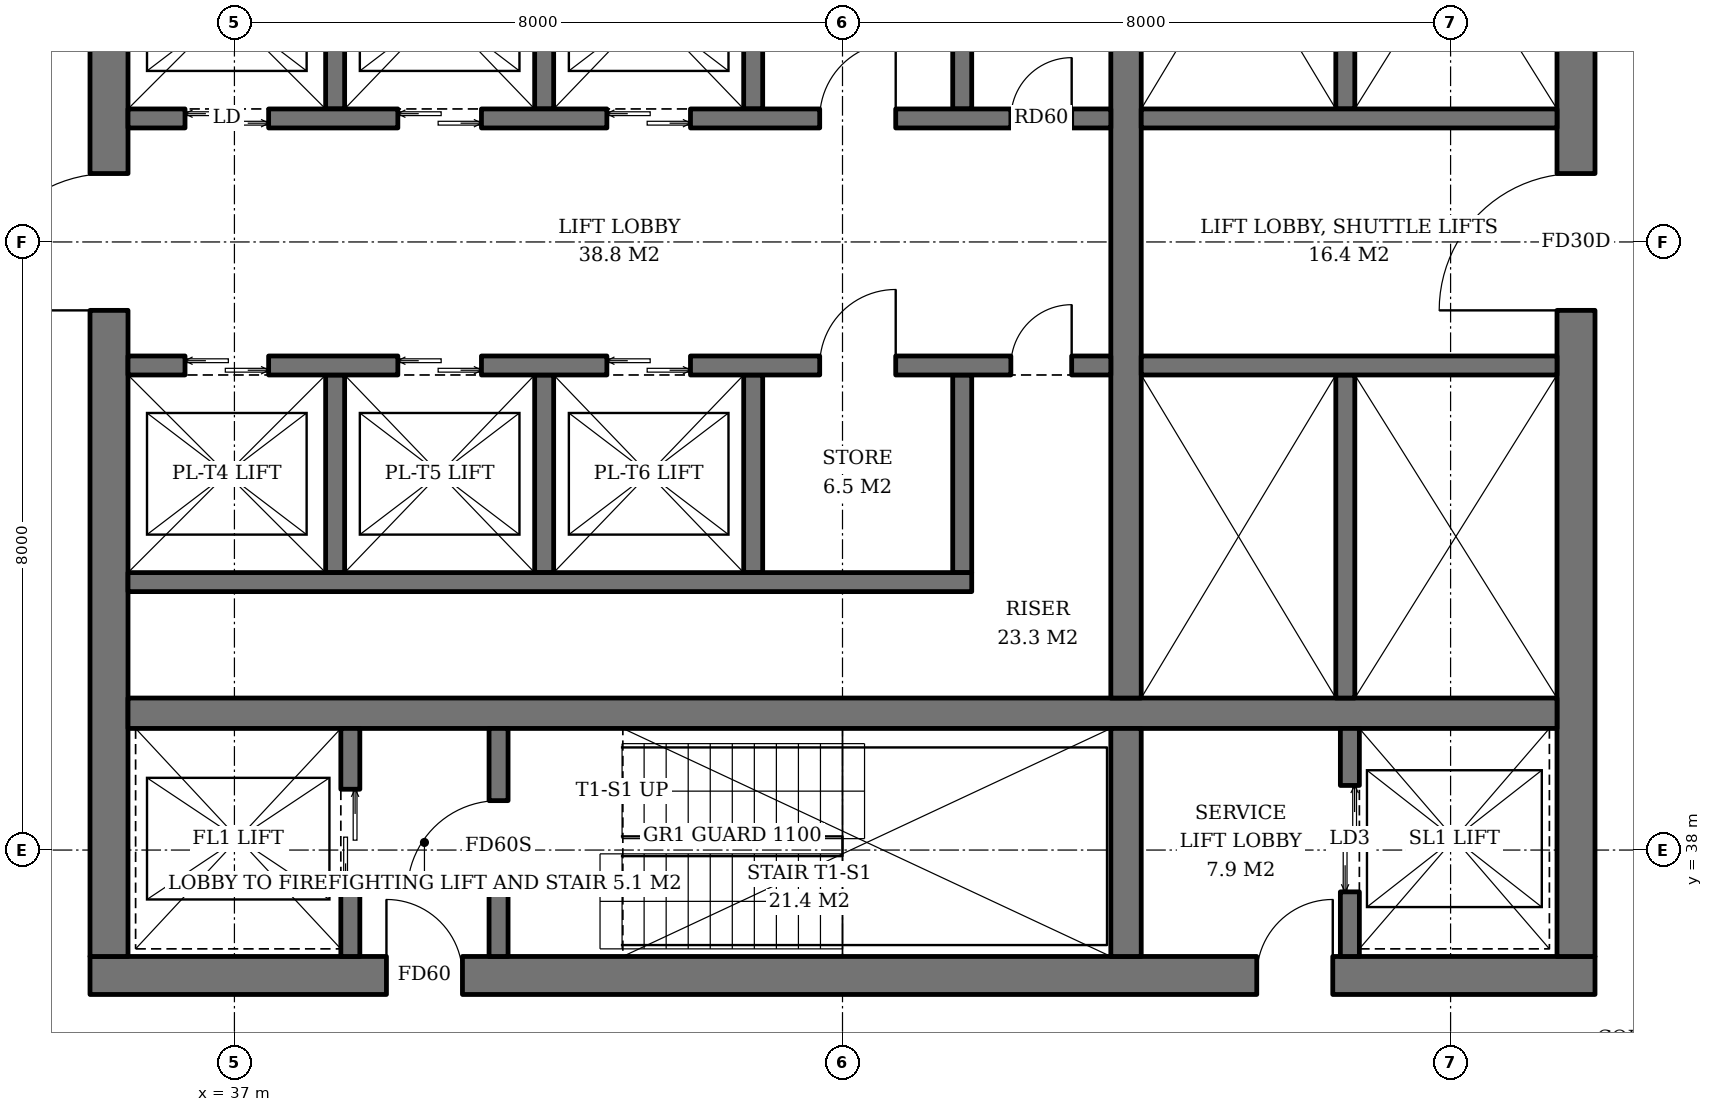
"""IFC4 building model, lengths in metres.
Left out: names, types, materials, properties, quantities, classifications, styles, units other than length and angle.
Written with IfcOpenShell. Run it as: python <this file> out.ifc"""

import sys

from ifc_helpers import new_model, si_unit, direction, frame, frame_2d, origin, place, context, subcontext, project, spatial, rectangle, extrude, element, fill, save


model = new_model("IFC4")
c1 = context("Model", 3, precision=1e-05, world=origin(), true_north=direction((0.0, 1.0)))
c2 = subcontext(c1, "Body", "Model", "MODEL_VIEW")
j1 = project(units=[si_unit("LENGTHUNIT", "METRE"), si_unit("PLANEANGLEUNIT", "RADIAN")], contexts=[c1])
p1 = place(None, origin())
s1 = spatial("IfcSite", under=j1, at=p1, CompositionType="ELEMENT")
p2 = place(p1, origin())
s2 = spatial("IfcBuilding", under=s1, at=p2, CompositionType="ELEMENT")
p3 = place(p2, frame((0.0, 0.0, 241.4)))
s3 = spatial("IfcBuildingStorey", under=s2, at=p3, CompositionType="ELEMENT", Elevation=241.4)
p4 = place(p3, frame((35.1, 36.35, 0.0), z_axis=(0.0, 0.0, 1.0), x_axis=(1.0, 0.0, 0.0)))
e1 = element("IfcWall", 1, at=p4, inside=s3, PredefinedType="SHEAR", context=c2, shape_type="SweptSolid", body=[
    extrude(rectangle(XDim=19.8, YDim=0.5, at=frame_2d((9.9, 0.0))), origin(), (0.0, 0.0, 1.0), 3.8),
])
p5 = place(p4, frame((3.9, 0.0, 0.0)))
e2 = element("IfcOpeningElement", 2, at=p5, cuts=e1, PredefinedType="OPENING", context=c2, shape_type="SweptSolid", body=[
    extrude(rectangle(XDim=1.0, YDim=2.1, at=frame_2d((0.5, 1.05))), frame((0.0, 0.26, 0.0), z_axis=(0.0, -1.0, 0.0), x_axis=(1.0, 0.0, 0.0)), (0.0, 0.0, 1.0), 0.52),
])
p6 = place(p4, frame((15.35, 0.0, 0.0)))
e3 = element("IfcOpeningElement", 3, at=p6, cuts=e1, PredefinedType="OPENING", context=c2, shape_type="SweptSolid", body=[
    extrude(rectangle(XDim=1.0, YDim=2.1, at=frame_2d((0.5, 1.05))), frame((0.0, 0.26, 0.0), z_axis=(0.0, -1.0, 0.0), x_axis=(1.0, 0.0, 0.0)), (0.0, 0.0, 1.0), 0.52),
])
p7 = place(p3, frame((35.35, 36.6, 0.0), z_axis=(0.0, 0.0, 1.0), x_axis=(0.0, 1.0, 0.0)))
e4 = element("IfcWall", 4, at=p7, inside=s3, PredefinedType="SHEAR", context=c2, shape_type="SweptSolid", body=[
    extrude(rectangle(XDim=18.8, YDim=0.5, at=frame_2d((9.4, 0.0))), origin(), (0.0, 0.0, 1.0), 3.8),
])
p8 = place(p7, frame((8.5, 0.0, 0.0)))
e5 = element("IfcOpeningElement", 5, at=p8, cuts=e4, PredefinedType="OPENING", context=c2, shape_type="SweptSolid", body=[
    extrude(rectangle(XDim=1.8, YDim=2.4, at=frame_2d((0.9, 1.2))), frame((0.0, 0.26, 0.0), z_axis=(0.0, -1.0, 0.0), x_axis=(1.0, 0.0, 0.0)), (0.0, 0.0, 1.0), 0.52),
])
p9 = place(p3, frame((54.65, 36.6, 0.0), z_axis=(0.0, 0.0, 1.0), x_axis=(0.0, 1.0, 0.0)))
e6 = element("IfcWall", 6, at=p9, inside=s3, PredefinedType="SHEAR", context=c2, shape_type="SweptSolid", body=[
    extrude(rectangle(XDim=18.8, YDim=0.5, at=frame_2d((9.4, 0.0))), origin(), (0.0, 0.0, 1.0), 3.8),
])
p10 = place(p9, frame((8.5, 0.0, 0.0)))
e7 = element("IfcOpeningElement", 7, at=p10, cuts=e6, PredefinedType="OPENING", context=c2, shape_type="SweptSolid", body=[
    extrude(rectangle(XDim=1.8, YDim=2.4, at=frame_2d((0.9, 1.2))), frame((0.0, 0.26, 0.0), z_axis=(0.0, -1.0, 0.0), x_axis=(1.0, 0.0, 0.0)), (0.0, 0.0, 1.0), 0.52),
])
p11 = place(p3, frame((35.6, 39.8, 0.0), z_axis=(0.0, 0.0, 1.0), x_axis=(1.0, 0.0, 0.0)))
e8 = element("IfcWall", 8, at=p11, inside=s3, PredefinedType="SHEAR", context=c2, shape_type="SweptSolid", body=[
    extrude(rectangle(XDim=18.8, YDim=0.4, at=frame_2d((9.4, 0.0))), origin(), (0.0, 0.0, 1.0), 3.8),
])
p12 = place(p3, frame((48.73, 36.6, 0.0), z_axis=(0.0, 0.0, 1.0), x_axis=(0.0, 1.0, 0.0)))
e9 = element("IfcWall", 9, at=p12, inside=s3, PredefinedType="SHEAR", context=c2, shape_type="SweptSolid", body=[
    extrude(rectangle(XDim=3.0, YDim=0.4, at=frame_2d((1.5, 0.0))), origin(), (0.0, 0.0, 1.0), 3.8),
])
p13 = place(p3, frame((48.73, 40.0, 0.0), z_axis=(0.0, 0.0, 1.0), x_axis=(0.0, 1.0, 0.0)))
e10 = element("IfcWall", 10, at=p13, inside=s3, PredefinedType="SHEAR", context=c2, shape_type="SweptSolid", body=[
    extrude(rectangle(XDim=12.0, YDim=0.4, at=frame_2d((6.0, 0.0))), origin(), (0.0, 0.0, 1.0), 3.8),
])
p14 = place(p3, frame((38.525, 36.6, 0.0), z_axis=(0.0, 0.0, 1.0), x_axis=(0.0, 1.0, 0.0)))
e11 = element("IfcWall", 11, at=p14, inside=s3, PredefinedType="SHEAR", context=c2, shape_type="SweptSolid", body=[
    extrude(rectangle(XDim=3.0, YDim=0.25, at=frame_2d((1.5, 0.0))), origin(), (0.0, 0.0, 1.0), 3.8),
])
p15 = place(p14, frame((0.9, 0.0, 0.0)))
e12 = element("IfcOpeningElement", 12, at=p15, cuts=e11, PredefinedType="OPENING", context=c2, shape_type="SweptSolid", body=[
    extrude(rectangle(XDim=1.3, YDim=2.2, at=frame_2d((0.65, 1.1))), frame((0.0, 0.135, 0.0), z_axis=(0.0, -1.0, 0.0), x_axis=(1.0, 0.0, 0.0)), (0.0, 0.0, 1.0), 0.27),
])
p16 = place(p3, frame((40.475, 36.6, 0.0), z_axis=(0.0, 0.0, 1.0), x_axis=(0.0, 1.0, 0.0)))
e13 = element("IfcWall", 13, at=p16, inside=s3, PredefinedType="SHEAR", context=c2, shape_type="SweptSolid", body=[
    extrude(rectangle(XDim=3.0, YDim=0.25, at=frame_2d((1.5, 0.0))), origin(), (0.0, 0.0, 1.0), 3.8),
])
p17 = place(p16, frame((0.85, 0.0, 0.0)))
e14 = element("IfcOpeningElement", 14, at=p17, cuts=e13, PredefinedType="OPENING", context=c2, shape_type="SweptSolid", body=[
    extrude(rectangle(XDim=1.2, YDim=2.1, at=frame_2d((0.6, 1.05))), frame((0.0, 0.135, 0.0), z_axis=(0.0, -1.0, 0.0), x_axis=(1.0, 0.0, 0.0)), (0.0, 0.0, 1.0), 0.27),
])
p18 = place(p3, frame((51.675, 36.6, 0.0), z_axis=(0.0, 0.0, 1.0), x_axis=(0.0, 1.0, 0.0)))
e15 = element("IfcWall", 15, at=p18, inside=s3, PredefinedType="SHEAR", context=c2, shape_type="SweptSolid", body=[
    extrude(rectangle(XDim=3.0, YDim=0.25, at=frame_2d((1.5, 0.0))), origin(), (0.0, 0.0, 1.0), 3.8),
])
p19 = place(p18, frame((0.85, 0.0, 0.0)))
e16 = element("IfcOpeningElement", 16, at=p19, cuts=e15, PredefinedType="OPENING", context=c2, shape_type="SweptSolid", body=[
    extrude(rectangle(XDim=1.4, YDim=2.4, at=frame_2d((0.7, 1.2))), frame((0.0, 0.135, 0.0), z_axis=(0.0, -1.0, 0.0), x_axis=(1.0, 0.0, 0.0)), (0.0, 0.0, 1.0), 0.27),
])
for number, where, z_axis, x_axis in (
    (17, (38.325, 47.75, 0.0), (0.0, 0.0, 1.0), (0.0, 1.0, 0.0)),
    (18, (41.075, 47.75, 0.0), (0.0, 0.0, 1.0), (0.0, 1.0, 0.0)),
    (19, (43.825, 47.75, 0.0), (0.0, 0.0, 1.0), (0.0, 1.0, 0.0)),
    (20, (46.575, 47.75, 0.0), (0.0, 0.0, 1.0), (0.0, 1.0, 0.0)),
):
    element("IfcWall", number, at=place(p3, frame(where, z_axis=z_axis, x_axis=x_axis)), inside=s3, PredefinedType="SHEAR", context=c2, shape_type="SweptSolid", body=[
        extrude(rectangle(XDim=2.6, YDim=0.25, at=frame_2d((1.3, 0.0))), origin(), (0.0, 0.0, 1.0), 3.8),
    ])
p20 = place(p3, frame((35.6, 47.625, 0.0), z_axis=(0.0, 0.0, 1.0), x_axis=(1.0, 0.0, 0.0)))
e21 = element("IfcWall", 21, at=p20, inside=s3, PredefinedType="SHEAR", context=c2, shape_type="SweptSolid", body=[
    extrude(rectangle(XDim=12.93, YDim=0.25, at=frame_2d((6.465, 0.0))), origin(), (0.0, 0.0, 1.0), 3.8),
])
p21 = place(p20, frame((0.75, 0.0, 0.0)))
e22 = element("IfcOpeningElement", 22, at=p21, cuts=e21, PredefinedType="OPENING", context=c2, shape_type="SweptSolid", body=[
    extrude(rectangle(XDim=1.1, YDim=2.2, at=frame_2d((0.55, 1.1))), frame((0.0, 0.135, 0.0), z_axis=(0.0, -1.0, 0.0), x_axis=(1.0, 0.0, 0.0)), (0.0, 0.0, 1.0), 0.27),
])
p22 = place(p20, frame((3.55, 0.0, 0.0)))
e23 = element("IfcOpeningElement", 23, at=p22, cuts=e21, PredefinedType="OPENING", context=c2, shape_type="SweptSolid", body=[
    extrude(rectangle(XDim=1.1, YDim=2.2, at=frame_2d((0.55, 1.1))), frame((0.0, 0.135, 0.0), z_axis=(0.0, -1.0, 0.0), x_axis=(1.0, 0.0, 0.0)), (0.0, 0.0, 1.0), 0.27),
])
p23 = place(p20, frame((6.3, 0.0, 0.0)))
e24 = element("IfcOpeningElement", 24, at=p23, cuts=e21, PredefinedType="OPENING", context=c2, shape_type="SweptSolid", body=[
    extrude(rectangle(XDim=1.1, YDim=2.2, at=frame_2d((0.55, 1.1))), frame((0.0, 0.135, 0.0), z_axis=(0.0, -1.0, 0.0), x_axis=(1.0, 0.0, 0.0)), (0.0, 0.0, 1.0), 0.27),
])
p24 = place(p20, frame((9.1, 0.0, 0.0)))
e25 = element("IfcOpeningElement", 25, at=p24, cuts=e21, PredefinedType="OPENING", context=c2, shape_type="SweptSolid", body=[
    extrude(rectangle(XDim=1.0, YDim=2.1, at=frame_2d((0.5, 1.05))), frame((0.0, 0.135, 0.0), z_axis=(0.0, -1.0, 0.0), x_axis=(1.0, 0.0, 0.0)), (0.0, 0.0, 1.0), 0.27),
])
p25 = place(p20, frame((11.615, 0.0, 0.0)))
e26 = element("IfcOpeningElement", 26, at=p25, cuts=e21, PredefinedType="OPENING", context=c2, shape_type="SweptSolid", body=[
    extrude(rectangle(XDim=0.8, YDim=2.0, at=frame_2d((0.4, 1.0))), frame((0.0, 0.135, 0.0), z_axis=(0.0, -1.0, 0.0), x_axis=(1.0, 0.0, 0.0)), (0.0, 0.0, 1.0), 0.27),
])
for number, where, z_axis, x_axis in (
    (27, (38.325, 44.25, 0.0), (0.0, 0.0, 1.0), (0.0, -1.0, 0.0)),
    (28, (41.075, 44.25, 0.0), (0.0, 0.0, 1.0), (0.0, -1.0, 0.0)),
    (29, (43.825, 44.25, 0.0), (0.0, 0.0, 1.0), (0.0, -1.0, 0.0)),
    (30, (46.575, 44.25, 0.0), (0.0, 0.0, 1.0), (0.0, -1.0, 0.0)),
):
    element("IfcWall", number, at=place(p3, frame(where, z_axis=z_axis, x_axis=x_axis)), inside=s3, PredefinedType="SHEAR", context=c2, shape_type="SweptSolid", body=[
        extrude(rectangle(XDim=2.6, YDim=0.25, at=frame_2d((1.3, 0.0))), origin(), (0.0, 0.0, 1.0), 3.8),
    ])
p26 = place(p3, frame((35.6, 41.525, 0.0), z_axis=(0.0, 0.0, 1.0), x_axis=(1.0, 0.0, 0.0)))
e31 = element("IfcWall", 31, at=p26, inside=s3, PredefinedType="SHEAR", context=c2, shape_type="SweptSolid", body=[
    extrude(rectangle(XDim=11.1, YDim=0.25, at=frame_2d((5.55, 0.0))), origin(), (0.0, 0.0, 1.0), 3.8),
])
p27 = place(p3, frame((35.6, 44.375, 0.0), z_axis=(0.0, 0.0, 1.0), x_axis=(1.0, 0.0, 0.0)))
e32 = element("IfcWall", 32, at=p27, inside=s3, PredefinedType="SHEAR", context=c2, shape_type="SweptSolid", body=[
    extrude(rectangle(XDim=12.93, YDim=0.25, at=frame_2d((6.465, 0.0))), origin(), (0.0, 0.0, 1.0), 3.8),
])
p28 = place(p27, frame((0.75, 0.0, 0.0)))
e33 = element("IfcOpeningElement", 33, at=p28, cuts=e32, PredefinedType="OPENING", context=c2, shape_type="SweptSolid", body=[
    extrude(rectangle(XDim=1.1, YDim=2.2, at=frame_2d((0.55, 1.1))), frame((0.0, 0.135, 0.0), z_axis=(0.0, -1.0, 0.0), x_axis=(1.0, 0.0, 0.0)), (0.0, 0.0, 1.0), 0.27),
])
p29 = place(p27, frame((3.55, 0.0, 0.0)))
e34 = element("IfcOpeningElement", 34, at=p29, cuts=e32, PredefinedType="OPENING", context=c2, shape_type="SweptSolid", body=[
    extrude(rectangle(XDim=1.1, YDim=2.2, at=frame_2d((0.55, 1.1))), frame((0.0, 0.135, 0.0), z_axis=(0.0, -1.0, 0.0), x_axis=(1.0, 0.0, 0.0)), (0.0, 0.0, 1.0), 0.27),
])
p30 = place(p27, frame((6.3, 0.0, 0.0)))
e35 = element("IfcOpeningElement", 35, at=p30, cuts=e32, PredefinedType="OPENING", context=c2, shape_type="SweptSolid", body=[
    extrude(rectangle(XDim=1.1, YDim=2.2, at=frame_2d((0.55, 1.1))), frame((0.0, 0.135, 0.0), z_axis=(0.0, -1.0, 0.0), x_axis=(1.0, 0.0, 0.0)), (0.0, 0.0, 1.0), 0.27),
])
p31 = place(p27, frame((9.1, 0.0, 0.0)))
e36 = element("IfcOpeningElement", 36, at=p31, cuts=e32, PredefinedType="OPENING", context=c2, shape_type="SweptSolid", body=[
    extrude(rectangle(XDim=1.0, YDim=2.1, at=frame_2d((0.5, 1.05))), frame((0.0, 0.135, 0.0), z_axis=(0.0, -1.0, 0.0), x_axis=(1.0, 0.0, 0.0)), (0.0, 0.0, 1.0), 0.27),
])
p32 = place(p27, frame((11.615, 0.0, 0.0)))
e37 = element("IfcOpeningElement", 37, at=p32, cuts=e32, PredefinedType="OPENING", context=c2, shape_type="SweptSolid", body=[
    extrude(rectangle(XDim=0.8, YDim=2.0, at=frame_2d((0.4, 1.0))), frame((0.0, 0.135, 0.0), z_axis=(0.0, -1.0, 0.0), x_axis=(1.0, 0.0, 0.0)), (0.0, 0.0, 1.0), 0.27),
])
p33 = place(p3, frame((51.615, 47.75, 0.0), z_axis=(0.0, 0.0, 1.0), x_axis=(0.0, 1.0, 0.0)))
e38 = element("IfcWall", 38, at=p33, inside=s3, PredefinedType="SHEAR", context=c2, shape_type="SweptSolid", body=[
    extrude(rectangle(XDim=4.25, YDim=0.25, at=frame_2d((2.125, 0.0))), origin(), (0.0, 0.0, 1.0), 3.8),
])
p34 = place(p3, frame((48.93, 47.625, 0.0), z_axis=(0.0, 0.0, 1.0), x_axis=(1.0, 0.0, 0.0)))
e39 = element("IfcWall", 39, at=p34, inside=s3, PredefinedType="SHEAR", context=c2, shape_type="SweptSolid", body=[
    extrude(rectangle(XDim=5.47, YDim=0.25, at=frame_2d((2.735, 0.0))), origin(), (0.0, 0.0, 1.0), 3.8),
])
p35 = place(p3, frame((51.615, 44.25, 0.0), z_axis=(0.0, 0.0, 1.0), x_axis=(0.0, -1.0, 0.0)))
e40 = element("IfcWall", 40, at=p35, inside=s3, PredefinedType="SHEAR", context=c2, shape_type="SweptSolid", body=[
    extrude(rectangle(XDim=4.25, YDim=0.25, at=frame_2d((2.125, 0.0))), origin(), (0.0, 0.0, 1.0), 3.8),
])
p36 = place(p3, frame((48.93, 44.375, 0.0), z_axis=(0.0, 0.0, 1.0), x_axis=(1.0, 0.0, 0.0)))
e41 = element("IfcWall", 41, at=p36, inside=s3, PredefinedType="SHEAR", context=c2, shape_type="SweptSolid", body=[
    extrude(rectangle(XDim=5.47, YDim=0.25, at=frame_2d((2.735, 0.0))), origin(), (0.0, 0.0, 1.0), 3.8),
])
p37 = place(p15, origin())
e42 = element("IfcDoor", 42, at=p37, inside=s3, OperationType="DOUBLE_DOOR_SLIDING", PredefinedType="DOOR", context=c2, shape_type="SweptSolid", body=[
    extrude(rectangle(XDim=1.3, YDim=2.2, at=frame_2d((0.65, 1.1))), frame((0.0, 0.025, 0.0), z_axis=(0.0, -1.0, 0.0), x_axis=(1.0, 0.0, 0.0)), (0.0, 0.0, 1.0), 0.05),
])
fill(e12, e42)
p38 = place(p17, origin())
e43 = element("IfcDoor", 43, at=p38, inside=s3, OperationType="SINGLE_SWING_LEFT", PredefinedType="DOOR", context=c2, shape_type="SweptSolid", body=[
    extrude(rectangle(XDim=1.2, YDim=2.1, at=frame_2d((0.6, 1.05))), frame((0.0, 0.025, 0.0), z_axis=(0.0, -1.0, 0.0), x_axis=(1.0, 0.0, 0.0)), (0.0, 0.0, 1.0), 0.05),
])
fill(e14, e43)
p39 = place(p19, origin())
e44 = element("IfcDoor", 44, at=p39, inside=s3, OperationType="DOUBLE_DOOR_SLIDING", PredefinedType="DOOR", context=c2, shape_type="SweptSolid", body=[
    extrude(rectangle(XDim=1.4, YDim=2.4, at=frame_2d((0.7, 1.2))), frame((0.0, 0.025, 0.0), z_axis=(0.0, -1.0, 0.0), x_axis=(1.0, 0.0, 0.0)), (0.0, 0.0, 1.0), 0.05),
])
fill(e16, e44)
p40 = place(p21, origin())
e45 = element("IfcDoor", 45, at=p40, inside=s3, OperationType="DOUBLE_DOOR_SLIDING", PredefinedType="DOOR", context=c2, shape_type="SweptSolid", body=[
    extrude(rectangle(XDim=1.1, YDim=2.2, at=frame_2d((0.55, 1.1))), frame((0.0, 0.025, 0.0), z_axis=(0.0, -1.0, 0.0), x_axis=(1.0, 0.0, 0.0)), (0.0, 0.0, 1.0), 0.05),
])
fill(e22, e45)
p41 = place(p22, origin())
e46 = element("IfcDoor", 46, at=p41, inside=s3, OperationType="DOUBLE_DOOR_SLIDING", PredefinedType="DOOR", context=c2, shape_type="SweptSolid", body=[
    extrude(rectangle(XDim=1.1, YDim=2.2, at=frame_2d((0.55, 1.1))), frame((0.0, 0.025, 0.0), z_axis=(0.0, -1.0, 0.0), x_axis=(1.0, 0.0, 0.0)), (0.0, 0.0, 1.0), 0.05),
])
fill(e23, e46)
p42 = place(p23, origin())
e47 = element("IfcDoor", 47, at=p42, inside=s3, OperationType="DOUBLE_DOOR_SLIDING", PredefinedType="DOOR", context=c2, shape_type="SweptSolid", body=[
    extrude(rectangle(XDim=1.1, YDim=2.2, at=frame_2d((0.55, 1.1))), frame((0.0, 0.025, 0.0), z_axis=(0.0, -1.0, 0.0), x_axis=(1.0, 0.0, 0.0)), (0.0, 0.0, 1.0), 0.05),
])
fill(e24, e47)
p43 = place(p24, origin())
e48 = element("IfcDoor", 48, at=p43, inside=s3, OperationType="SINGLE_SWING_RIGHT", PredefinedType="DOOR", context=c2, shape_type="SweptSolid", body=[
    extrude(rectangle(XDim=1.0, YDim=2.1, at=frame_2d((0.5, 1.05))), frame((0.0, 0.025, 0.0), z_axis=(0.0, -1.0, 0.0), x_axis=(1.0, 0.0, 0.0)), (0.0, 0.0, 1.0), 0.05),
])
fill(e25, e48)
p44 = place(p25, origin())
e49 = element("IfcDoor", 49, at=p44, inside=s3, OperationType="SINGLE_SWING_RIGHT", PredefinedType="DOOR", context=c2, shape_type="SweptSolid", body=[
    extrude(rectangle(XDim=0.8, YDim=2.0, at=frame_2d((0.4, 1.0))), frame((0.0, 0.025, 0.0), z_axis=(0.0, -1.0, 0.0), x_axis=(1.0, 0.0, 0.0)), (0.0, 0.0, 1.0), 0.05),
])
fill(e26, e49)
p45 = place(p28, origin())
e50 = element("IfcDoor", 50, at=p45, inside=s3, OperationType="DOUBLE_DOOR_SLIDING", PredefinedType="DOOR", context=c2, shape_type="SweptSolid", body=[
    extrude(rectangle(XDim=1.1, YDim=2.2, at=frame_2d((0.55, 1.1))), frame((0.0, 0.025, 0.0), z_axis=(0.0, -1.0, 0.0), x_axis=(1.0, 0.0, 0.0)), (0.0, 0.0, 1.0), 0.05),
])
fill(e33, e50)
p46 = place(p29, origin())
e51 = element("IfcDoor", 51, at=p46, inside=s3, OperationType="DOUBLE_DOOR_SLIDING", PredefinedType="DOOR", context=c2, shape_type="SweptSolid", body=[
    extrude(rectangle(XDim=1.1, YDim=2.2, at=frame_2d((0.55, 1.1))), frame((0.0, 0.025, 0.0), z_axis=(0.0, -1.0, 0.0), x_axis=(1.0, 0.0, 0.0)), (0.0, 0.0, 1.0), 0.05),
])
fill(e34, e51)
p47 = place(p30, origin())
e52 = element("IfcDoor", 52, at=p47, inside=s3, OperationType="DOUBLE_DOOR_SLIDING", PredefinedType="DOOR", context=c2, shape_type="SweptSolid", body=[
    extrude(rectangle(XDim=1.1, YDim=2.2, at=frame_2d((0.55, 1.1))), frame((0.0, 0.025, 0.0), z_axis=(0.0, -1.0, 0.0), x_axis=(1.0, 0.0, 0.0)), (0.0, 0.0, 1.0), 0.05),
])
fill(e35, e52)
p48 = place(p31, origin())
e53 = element("IfcDoor", 53, at=p48, inside=s3, OperationType="SINGLE_SWING_RIGHT", PredefinedType="DOOR", context=c2, shape_type="SweptSolid", body=[
    extrude(rectangle(XDim=1.0, YDim=2.1, at=frame_2d((0.5, 1.05))), frame((0.0, 0.025, 0.0), z_axis=(0.0, -1.0, 0.0), x_axis=(1.0, 0.0, 0.0)), (0.0, 0.0, 1.0), 0.05),
])
fill(e36, e53)
p49 = place(p32, origin())
e54 = element("IfcDoor", 54, at=p49, inside=s3, OperationType="SINGLE_SWING_RIGHT", PredefinedType="DOOR", context=c2, shape_type="SweptSolid", body=[
    extrude(rectangle(XDim=0.8, YDim=2.0, at=frame_2d((0.4, 1.0))), frame((0.0, 0.025, 0.0), z_axis=(0.0, -1.0, 0.0), x_axis=(1.0, 0.0, 0.0)), (0.0, 0.0, 1.0), 0.05),
])
fill(e37, e54)
p50 = place(p5, origin())
e55 = element("IfcDoor", 55, at=p50, inside=s3, OperationType="SINGLE_SWING_LEFT", PredefinedType="DOOR", context=c2, shape_type="SweptSolid", body=[
    extrude(rectangle(XDim=1.0, YDim=2.1, at=frame_2d((0.5, 1.05))), frame((0.0, 0.025, 0.0), z_axis=(0.0, -1.0, 0.0), x_axis=(1.0, 0.0, 0.0)), (0.0, 0.0, 1.0), 0.05),
])
fill(e2, e55)
p51 = place(p8, origin())
e56 = element("IfcDoor", 56, at=p51, inside=s3, OperationType="DOUBLE_DOOR_SINGLE_SWING", PredefinedType="DOOR", context=c2, shape_type="SweptSolid", body=[
    extrude(rectangle(XDim=1.8, YDim=2.4, at=frame_2d((0.9, 1.2))), frame((0.0, 0.025, 0.0), z_axis=(0.0, -1.0, 0.0), x_axis=(1.0, 0.0, 0.0)), (0.0, 0.0, 1.0), 0.05),
])
fill(e5, e56)
p52 = place(p10, origin())
e57 = element("IfcDoor", 57, at=p52, inside=s3, OperationType="DOUBLE_DOOR_SINGLE_SWING", PredefinedType="DOOR", context=c2, shape_type="SweptSolid", body=[
    extrude(rectangle(XDim=1.8, YDim=2.4, at=frame_2d((0.9, 1.2))), frame((0.0, 0.025, 0.0), z_axis=(0.0, -1.0, 0.0), x_axis=(1.0, 0.0, 0.0)), (0.0, 0.0, 1.0), 0.05),
])
fill(e7, e57)
p53 = place(p6, origin())
e58 = element("IfcDoor", 58, at=p53, inside=s3, OperationType="SINGLE_SWING_RIGHT", PredefinedType="DOOR", context=c2, shape_type="SweptSolid", body=[
    extrude(rectangle(XDim=1.0, YDim=2.1, at=frame_2d((0.5, 1.05))), frame((0.0, 0.025, 0.0), z_axis=(0.0, -1.0, 0.0), x_axis=(1.0, 0.0, 0.0)), (0.0, 0.0, 1.0), 0.05),
])
fill(e3, e58)
save(model, sys.argv[1])
